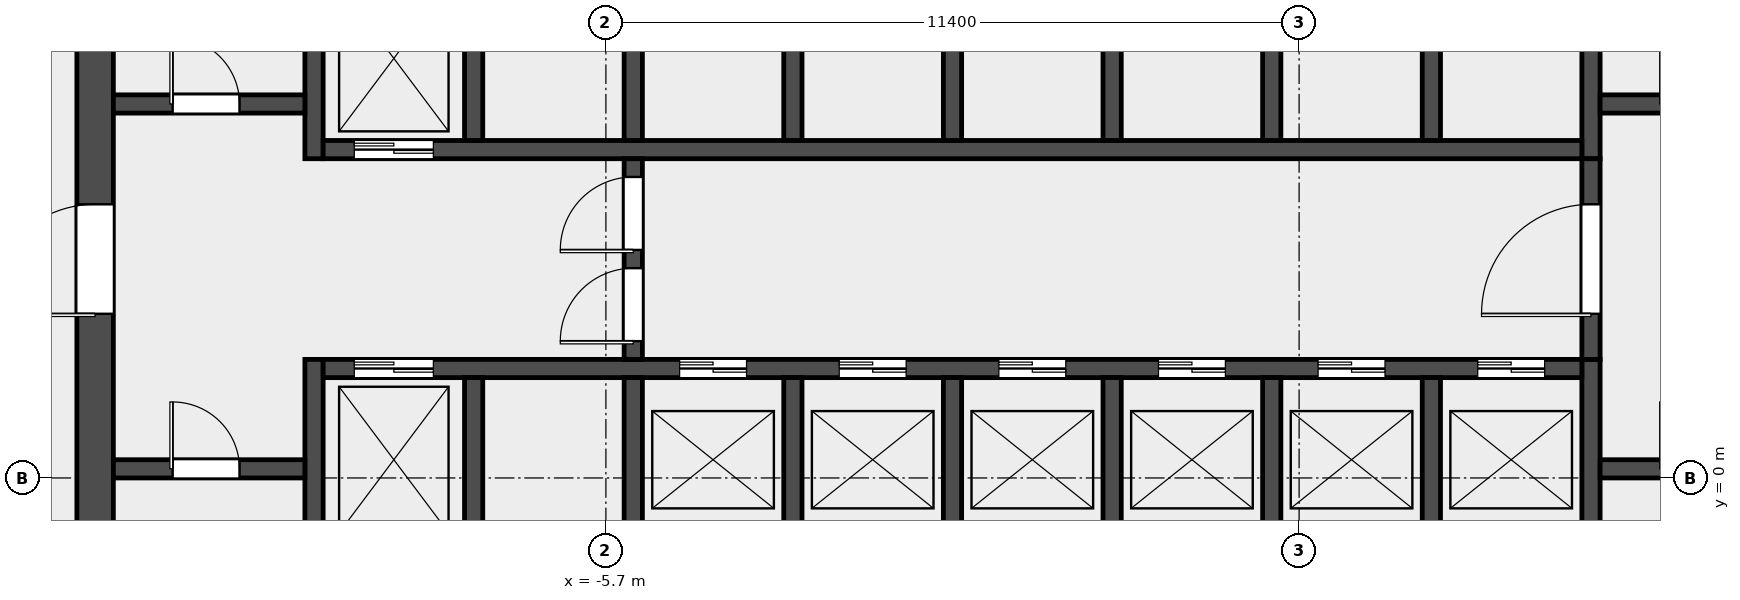
"""IFC4 building model, lengths in metres.
Left out: names, types, materials, properties, quantities, classifications, styles, units other than length and angle.
Written with IfcOpenShell. Run it as: python <this file> out.ifc"""

import sys

from ifc_helpers import new_model, si_unit, direction, frame, frame_2d, origin, place, context, subcontext, project, spatial, rectangle, extrude, element, fill, save


model = new_model("IFC4")
c1 = context("Model", 3, precision=1e-05, world=origin(), true_north=direction((0.0, 1.0)))
c2 = subcontext(c1, "Body", "Model", "MODEL_VIEW")
j1 = project(units=[si_unit("LENGTHUNIT", "METRE"), si_unit("PLANEANGLEUNIT", "RADIAN")], contexts=[c1])
p1 = place(None, origin())
s1 = spatial("IfcSite", under=j1, at=p1, CompositionType="ELEMENT")
p2 = place(p1, origin())
s2 = spatial("IfcBuilding", under=s1, at=p2, CompositionType="ELEMENT")
p3 = place(p2, frame((0.0, 0.0, 88.6)))
s3 = spatial("IfcBuildingStorey", under=s2, at=p3, CompositionType="ELEMENT", Elevation=88.6)
p4 = place(p3, frame((-14.1, -6.6, 0.0), z_axis=(0.0, 0.0, 1.0), x_axis=(0.0, 1.0, 0.0)))
e1 = element("IfcWall", 1, at=p4, inside=s3, PredefinedType="SHEAR", context=c2, shape_type="SweptSolid", body=[
    extrude(rectangle(XDim=19.5, YDim=0.6, at=frame_2d((9.75, 0.0))), origin(), (0.0, 0.0, 1.0), 5.7),
])
p5 = place(p4, frame((9.3, 0.0, 0.0)))
e2 = element("IfcOpeningElement", 2, at=p5, cuts=e1, PredefinedType="OPENING", context=c2, shape_type="SweptSolid", body=[
    extrude(rectangle(XDim=1.8, YDim=2.1, at=frame_2d((0.9, 1.05))), frame((0.0, 0.312, 0.0), z_axis=(0.0, -1.0, 0.0), x_axis=(1.0, 0.0, 0.0)), (0.0, 0.0, 1.0), 0.624),
])
p6 = place(p3, frame((-10.5, -6.6, 0.0), z_axis=(0.0, 0.0, 1.0), x_axis=(0.0, 1.0, 0.0)))
e3 = element("IfcWall", 3, at=p6, inside=s3, PredefinedType="SHEAR", context=c2, shape_type="SweptSolid", body=[
    extrude(rectangle(XDim=8.55, YDim=0.3, at=frame_2d((4.275, 0.0))), origin(), (0.0, 0.0, 1.0), 5.7),
])
p7 = place(p3, frame((-10.5, 5.25, 0.0), z_axis=(0.0, 0.0, 1.0), x_axis=(0.0, 1.0, 0.0)))
e4 = element("IfcWall", 4, at=p7, inside=s3, PredefinedType="SHEAR", context=c2, shape_type="SweptSolid", body=[
    extrude(rectangle(XDim=7.65, YDim=0.3, at=frame_2d((3.825, 0.0))), origin(), (0.0, 0.0, 1.0), 5.7),
])
p8 = place(p3, frame((10.5, -6.6, 0.0), z_axis=(0.0, 0.0, 1.0), x_axis=(0.0, 1.0, 0.0)))
e5 = element("IfcWall", 5, at=p8, inside=s3, PredefinedType="SHEAR", context=c2, shape_type="SweptSolid", body=[
    extrude(rectangle(XDim=8.55, YDim=0.3, at=frame_2d((4.275, 0.0))), origin(), (0.0, 0.0, 1.0), 5.7),
])
p9 = place(p3, frame((10.5, 5.25, 0.0), z_axis=(0.0, 0.0, 1.0), x_axis=(0.0, 1.0, 0.0)))
e6 = element("IfcWall", 6, at=p9, inside=s3, PredefinedType="SHEAR", context=c2, shape_type="SweptSolid", body=[
    extrude(rectangle(XDim=7.65, YDim=0.3, at=frame_2d((3.825, 0.0))), origin(), (0.0, 0.0, 1.0), 5.7),
])
p10 = place(p3, frame((-13.8, 0.15, 0.0), z_axis=(0.0, 0.0, 1.0), x_axis=(1.0, 0.0, 0.0)))
e7 = element("IfcWall", 7, at=p10, inside=s3, PredefinedType="SOLIDWALL", context=c2, shape_type="SweptSolid", body=[
    extrude(rectangle(XDim=3.15, YDim=0.3, at=frame_2d((1.575, 0.0))), origin(), (0.0, 0.0, 1.0), 5.7),
])
p11 = place(p10, frame((0.975, 0.0, 0.0)))
e8 = element("IfcOpeningElement", 8, at=p11, cuts=e7, PredefinedType="OPENING", context=c2, shape_type="SweptSolid", body=[
    extrude(rectangle(XDim=1.1, YDim=2.1, at=frame_2d((0.55, 1.05))), frame((0.0, 0.162, 0.0), z_axis=(0.0, -1.0, 0.0), x_axis=(1.0, 0.0, 0.0)), (0.0, 0.0, 1.0), 0.324),
])
p12 = place(p3, frame((-13.8, 6.15, 0.0), z_axis=(0.0, 0.0, 1.0), x_axis=(1.0, 0.0, 0.0)))
e9 = element("IfcWall", 9, at=p12, inside=s3, PredefinedType="SOLIDWALL", context=c2, shape_type="SweptSolid", body=[
    extrude(rectangle(XDim=3.15, YDim=0.3, at=frame_2d((1.575, 0.0))), origin(), (0.0, 0.0, 1.0), 5.7),
])
p13 = place(p12, frame((0.975, 0.0, 0.0)))
e10 = element("IfcOpeningElement", 10, at=p13, cuts=e9, PredefinedType="OPENING", context=c2, shape_type="SweptSolid", body=[
    extrude(rectangle(XDim=1.1, YDim=2.1, at=frame_2d((0.55, 1.05))), frame((0.0, 0.162, 0.0), z_axis=(0.0, -1.0, 0.0), x_axis=(1.0, 0.0, 0.0)), (0.0, 0.0, 1.0), 0.324),
])
p14 = place(p3, frame((10.65, 0.15, 0.0), z_axis=(0.0, 0.0, 1.0), x_axis=(1.0, 0.0, 0.0)))
e11 = element("IfcWall", 11, at=p14, inside=s3, PredefinedType="SOLIDWALL", context=c2, shape_type="SweptSolid", body=[
    extrude(rectangle(XDim=3.15, YDim=0.3, at=frame_2d((1.575, 0.0))), origin(), (0.0, 0.0, 1.0), 5.7),
])
p15 = place(p14, frame((1.025, 0.0, 0.0)))
e12 = element("IfcOpeningElement", 12, at=p15, cuts=e11, PredefinedType="OPENING", context=c2, shape_type="SweptSolid", body=[
    extrude(rectangle(XDim=1.1, YDim=2.1, at=frame_2d((0.55, 1.05))), frame((0.0, 0.162, 0.0), z_axis=(0.0, -1.0, 0.0), x_axis=(1.0, 0.0, 0.0)), (0.0, 0.0, 1.0), 0.324),
])
p16 = place(p3, frame((10.65, 6.15, 0.0), z_axis=(0.0, 0.0, 1.0), x_axis=(1.0, 0.0, 0.0)))
e13 = element("IfcWall", 13, at=p16, inside=s3, PredefinedType="SOLIDWALL", context=c2, shape_type="SweptSolid", body=[
    extrude(rectangle(XDim=3.15, YDim=0.3, at=frame_2d((1.575, 0.0))), origin(), (0.0, 0.0, 1.0), 5.7),
])
p17 = place(p16, frame((1.025, 0.0, 0.0)))
e14 = element("IfcOpeningElement", 14, at=p17, cuts=e13, PredefinedType="OPENING", context=c2, shape_type="SweptSolid", body=[
    extrude(rectangle(XDim=1.1, YDim=2.1, at=frame_2d((0.55, 1.05))), frame((0.0, 0.162, 0.0), z_axis=(0.0, -1.0, 0.0), x_axis=(1.0, 0.0, 0.0)), (0.0, 0.0, 1.0), 0.324),
])
p18 = place(p3, frame((-10.35, 1.8, 0.0), z_axis=(0.0, 0.0, 1.0), x_axis=(1.0, 0.0, 0.0)))
e15 = element("IfcWall", 15, at=p18, inside=s3, PredefinedType="SOLIDWALL", context=c2, shape_type="SweptSolid", body=[
    extrude(rectangle(XDim=20.7, YDim=0.3, at=frame_2d((10.35, 0.0))), origin(), (0.0, 0.0, 1.0), 5.7),
])
p19 = place(p18, frame((0.512, 0.0, 0.0)))
e16 = element("IfcOpeningElement", 16, at=p19, cuts=e15, PredefinedType="OPENING", context=c2, shape_type="SweptSolid", body=[
    extrude(rectangle(XDim=1.3, YDim=2.1, at=frame_2d((0.65, 1.05))), frame((0.0, 0.162, 0.0), z_axis=(0.0, -1.0, 0.0), x_axis=(1.0, 0.0, 0.0)), (0.0, 0.0, 1.0), 0.324),
])
p20 = place(p18, frame((5.863, 0.0, 0.0)))
e17 = element("IfcOpeningElement", 17, at=p20, cuts=e15, PredefinedType="OPENING", context=c2, shape_type="SweptSolid", body=[
    extrude(rectangle(XDim=1.1, YDim=2.1, at=frame_2d((0.55, 1.05))), frame((0.0, 0.162, 0.0), z_axis=(0.0, -1.0, 0.0), x_axis=(1.0, 0.0, 0.0)), (0.0, 0.0, 1.0), 0.324),
])
p21 = place(p18, frame((8.488, 0.0, 0.0)))
e18 = element("IfcOpeningElement", 18, at=p21, cuts=e15, PredefinedType="OPENING", context=c2, shape_type="SweptSolid", body=[
    extrude(rectangle(XDim=1.1, YDim=2.1, at=frame_2d((0.55, 1.05))), frame((0.0, 0.162, 0.0), z_axis=(0.0, -1.0, 0.0), x_axis=(1.0, 0.0, 0.0)), (0.0, 0.0, 1.0), 0.324),
])
p22 = place(p18, frame((11.113, 0.0, 0.0)))
e19 = element("IfcOpeningElement", 19, at=p22, cuts=e15, PredefinedType="OPENING", context=c2, shape_type="SweptSolid", body=[
    extrude(rectangle(XDim=1.1, YDim=2.1, at=frame_2d((0.55, 1.05))), frame((0.0, 0.162, 0.0), z_axis=(0.0, -1.0, 0.0), x_axis=(1.0, 0.0, 0.0)), (0.0, 0.0, 1.0), 0.324),
])
p23 = place(p18, frame((13.738, 0.0, 0.0)))
e20 = element("IfcOpeningElement", 20, at=p23, cuts=e15, PredefinedType="OPENING", context=c2, shape_type="SweptSolid", body=[
    extrude(rectangle(XDim=1.1, YDim=2.1, at=frame_2d((0.55, 1.05))), frame((0.0, 0.162, 0.0), z_axis=(0.0, -1.0, 0.0), x_axis=(1.0, 0.0, 0.0)), (0.0, 0.0, 1.0), 0.324),
])
p24 = place(p18, frame((16.363, 0.0, 0.0)))
e21 = element("IfcOpeningElement", 21, at=p24, cuts=e15, PredefinedType="OPENING", context=c2, shape_type="SweptSolid", body=[
    extrude(rectangle(XDim=1.1, YDim=2.1, at=frame_2d((0.55, 1.05))), frame((0.0, 0.162, 0.0), z_axis=(0.0, -1.0, 0.0), x_axis=(1.0, 0.0, 0.0)), (0.0, 0.0, 1.0), 0.324),
])
p25 = place(p18, frame((18.988, 0.0, 0.0)))
e22 = element("IfcOpeningElement", 22, at=p25, cuts=e15, PredefinedType="OPENING", context=c2, shape_type="SweptSolid", body=[
    extrude(rectangle(XDim=1.1, YDim=2.1, at=frame_2d((0.55, 1.05))), frame((0.0, 0.162, 0.0), z_axis=(0.0, -1.0, 0.0), x_axis=(1.0, 0.0, 0.0)), (0.0, 0.0, 1.0), 0.324),
])
p26 = place(p3, frame((-10.35, 5.4, 0.0), z_axis=(0.0, 0.0, 1.0), x_axis=(1.0, 0.0, 0.0)))
e23 = element("IfcWall", 23, at=p26, inside=s3, PredefinedType="SOLIDWALL", context=c2, shape_type="SweptSolid", body=[
    extrude(rectangle(XDim=20.7, YDim=0.3, at=frame_2d((10.35, 0.0))), origin(), (0.0, 0.0, 1.0), 5.7),
])
p27 = place(p26, frame((0.512, 0.0, 0.0)))
e24 = element("IfcOpeningElement", 24, at=p27, cuts=e23, PredefinedType="OPENING", context=c2, shape_type="SweptSolid", body=[
    extrude(rectangle(XDim=1.3, YDim=2.1, at=frame_2d((0.65, 1.05))), frame((0.0, 0.162, 0.0), z_axis=(0.0, -1.0, 0.0), x_axis=(1.0, 0.0, 0.0)), (0.0, 0.0, 1.0), 0.324),
])
for number, where, z_axis, x_axis in (
    (25, (-7.875, -1.05, 0.0), (0.0, 0.0, 1.0), (0.0, 1.0, 0.0)),
    (26, (-5.25, -1.05, 0.0), (0.0, 0.0, 1.0), (0.0, 1.0, 0.0)),
    (27, (-2.625, -1.05, 0.0), (0.0, 0.0, 1.0), (0.0, 1.0, 0.0)),
    (28, (0.0, -1.05, 0.0), (0.0, 0.0, 1.0), (0.0, 1.0, 0.0)),
    (29, (2.625, -1.05, 0.0), (0.0, 0.0, 1.0), (0.0, 1.0, 0.0)),
    (30, (5.25, -1.05, 0.0), (0.0, 0.0, 1.0), (0.0, 1.0, 0.0)),
    (31, (7.875, -1.05, 0.0), (0.0, 0.0, 1.0), (0.0, 1.0, 0.0)),
    (32, (-7.875, 5.55, 0.0), (0.0, 0.0, 1.0), (0.0, 1.0, 0.0)),
    (33, (-5.25, 5.55, 0.0), (0.0, 0.0, 1.0), (0.0, 1.0, 0.0)),
    (34, (-2.625, 5.55, 0.0), (0.0, 0.0, 1.0), (0.0, 1.0, 0.0)),
    (35, (0.0, 5.55, 0.0), (0.0, 0.0, 1.0), (0.0, 1.0, 0.0)),
    (36, (2.625, 5.55, 0.0), (0.0, 0.0, 1.0), (0.0, 1.0, 0.0)),
    (37, (5.25, 5.55, 0.0), (0.0, 0.0, 1.0), (0.0, 1.0, 0.0)),
    (38, (7.875, 5.55, 0.0), (0.0, 0.0, 1.0), (0.0, 1.0, 0.0)),
):
    element("IfcWall", number, at=place(p3, frame(where, z_axis=z_axis, x_axis=x_axis)), inside=s3, PredefinedType="SOLIDWALL", context=c2, shape_type="SweptSolid", body=[
        extrude(rectangle(XDim=2.7, YDim=0.3, at=frame_2d((1.35, 0.0))), origin(), (0.0, 0.0, 1.0), 5.7),
    ])
p28 = place(p3, frame((-5.25, 1.95, 0.0), z_axis=(0.0, 0.0, 1.0), x_axis=(0.0, 1.0, 0.0)))
e39 = element("IfcWall", 39, at=p28, inside=s3, PredefinedType="SOLIDWALL", context=c2, shape_type="SweptSolid", body=[
    extrude(rectangle(XDim=3.3, YDim=0.3, at=frame_2d((1.65, 0.0))), origin(), (0.0, 0.0, 1.0), 5.7),
])
p29 = place(p28, frame((0.3, 0.0, 0.0)))
e40 = element("IfcOpeningElement", 40, at=p29, cuts=e39, PredefinedType="OPENING", context=c2, shape_type="SweptSolid", body=[
    extrude(rectangle(XDim=1.2, YDim=2.1, at=frame_2d((0.6, 1.05))), frame((0.0, 0.162, 0.0), z_axis=(0.0, -1.0, 0.0), x_axis=(1.0, 0.0, 0.0)), (0.0, 0.0, 1.0), 0.324),
])
p30 = place(p28, frame((1.8, 0.0, 0.0)))
e41 = element("IfcOpeningElement", 41, at=p30, cuts=e39, PredefinedType="OPENING", context=c2, shape_type="SweptSolid", body=[
    extrude(rectangle(XDim=1.2, YDim=2.1, at=frame_2d((0.6, 1.05))), frame((0.0, 0.162, 0.0), z_axis=(0.0, -1.0, 0.0), x_axis=(1.0, 0.0, 0.0)), (0.0, 0.0, 1.0), 0.324),
])
p31 = place(p3, frame((10.5, 1.95, 0.0), z_axis=(0.0, 0.0, 1.0), x_axis=(0.0, 1.0, 0.0)))
e42 = element("IfcWall", 42, at=p31, inside=s3, PredefinedType="SOLIDWALL", context=c2, shape_type="SweptSolid", body=[
    extrude(rectangle(XDim=3.3, YDim=0.3, at=frame_2d((1.65, 0.0))), origin(), (0.0, 0.0, 1.0), 5.7),
])
p32 = place(p31, frame((0.75, 0.0, 0.0)))
e43 = element("IfcOpeningElement", 43, at=p32, cuts=e42, PredefinedType="OPENING", context=c2, shape_type="SweptSolid", body=[
    extrude(rectangle(XDim=1.8, YDim=2.1, at=frame_2d((0.9, 1.05))), frame((0.0, 0.162, 0.0), z_axis=(0.0, -1.0, 0.0), x_axis=(1.0, 0.0, 0.0)), (0.0, 0.0, 1.0), 0.324),
])
p33 = place(p11, origin())
e44 = element("IfcDoor", 44, at=p33, inside=s3, OperationType="SINGLE_SWING_LEFT", PredefinedType="DOOR", context=c2, shape_type="SweptSolid", body=[
    extrude(rectangle(XDim=1.1, YDim=2.1, at=frame_2d((0.55, 1.05))), frame((0.0, 0.025, 0.0), z_axis=(0.0, -1.0, 0.0), x_axis=(1.0, 0.0, 0.0)), (0.0, 0.0, 1.0), 0.05),
])
fill(e8, e44)
p34 = place(p13, origin())
e45 = element("IfcDoor", 45, at=p34, inside=s3, OperationType="SINGLE_SWING_LEFT", PredefinedType="DOOR", context=c2, shape_type="SweptSolid", body=[
    extrude(rectangle(XDim=1.1, YDim=2.1, at=frame_2d((0.55, 1.05))), frame((0.0, 0.025, 0.0), z_axis=(0.0, -1.0, 0.0), x_axis=(1.0, 0.0, 0.0)), (0.0, 0.0, 1.0), 0.05),
])
fill(e10, e45)
p35 = place(p5, origin())
e46 = element("IfcDoor", 46, at=p35, inside=s3, OperationType="DOUBLE_DOOR_SINGLE_SWING", PredefinedType="DOOR", context=c2, shape_type="SweptSolid", body=[
    extrude(rectangle(XDim=1.8, YDim=2.1, at=frame_2d((0.9, 1.05))), frame((0.0, 0.025, 0.0), z_axis=(0.0, -1.0, 0.0), x_axis=(1.0, 0.0, 0.0)), (0.0, 0.0, 1.0), 0.05),
])
fill(e2, e46)
p36 = place(p29, origin())
e47 = element("IfcDoor", 47, at=p36, inside=s3, OperationType="SINGLE_SWING_LEFT", PredefinedType="DOOR", context=c2, shape_type="SweptSolid", body=[
    extrude(rectangle(XDim=1.2, YDim=2.1, at=frame_2d((0.6, 1.05))), frame((0.0, 0.025, 0.0), z_axis=(0.0, -1.0, 0.0), x_axis=(1.0, 0.0, 0.0)), (0.0, 0.0, 1.0), 0.05),
])
fill(e40, e47)
p37 = place(p30, origin())
e48 = element("IfcDoor", 48, at=p37, inside=s3, OperationType="SINGLE_SWING_RIGHT", PredefinedType="DOOR", context=c2, shape_type="SweptSolid", body=[
    extrude(rectangle(XDim=1.2, YDim=2.1, at=frame_2d((0.6, 1.05))), frame((0.0, 0.025, 0.0), z_axis=(0.0, -1.0, 0.0), x_axis=(1.0, 0.0, 0.0)), (0.0, 0.0, 1.0), 0.05),
])
fill(e41, e48)
p38 = place(p32, origin())
e49 = element("IfcDoor", 49, at=p38, inside=s3, OperationType="DOUBLE_DOOR_SINGLE_SWING", PredefinedType="DOOR", context=c2, shape_type="SweptSolid", body=[
    extrude(rectangle(XDim=1.8, YDim=2.1, at=frame_2d((0.9, 1.05))), frame((0.0, 0.025, 0.0), z_axis=(0.0, -1.0, 0.0), x_axis=(1.0, 0.0, 0.0)), (0.0, 0.0, 1.0), 0.05),
])
fill(e43, e49)
p39 = place(p19, origin())
e50 = element("IfcDoor", 50, at=p39, inside=s3, OperationType="DOUBLE_DOOR_SLIDING", PredefinedType="DOOR", context=c2, shape_type="SweptSolid", body=[
    extrude(rectangle(XDim=1.3, YDim=2.1, at=frame_2d((0.65, 1.05))), frame((0.0, 0.025, 0.0), z_axis=(0.0, -1.0, 0.0), x_axis=(1.0, 0.0, 0.0)), (0.0, 0.0, 1.0), 0.05),
])
fill(e16, e50)
p40 = place(p20, origin())
e51 = element("IfcDoor", 51, at=p40, inside=s3, OperationType="DOUBLE_DOOR_SLIDING", PredefinedType="DOOR", context=c2, shape_type="SweptSolid", body=[
    extrude(rectangle(XDim=1.1, YDim=2.1, at=frame_2d((0.55, 1.05))), frame((0.0, 0.025, 0.0), z_axis=(0.0, -1.0, 0.0), x_axis=(1.0, 0.0, 0.0)), (0.0, 0.0, 1.0), 0.05),
])
fill(e17, e51)
p41 = place(p21, origin())
e52 = element("IfcDoor", 52, at=p41, inside=s3, OperationType="DOUBLE_DOOR_SLIDING", PredefinedType="DOOR", context=c2, shape_type="SweptSolid", body=[
    extrude(rectangle(XDim=1.1, YDim=2.1, at=frame_2d((0.55, 1.05))), frame((0.0, 0.025, 0.0), z_axis=(0.0, -1.0, 0.0), x_axis=(1.0, 0.0, 0.0)), (0.0, 0.0, 1.0), 0.05),
])
fill(e18, e52)
p42 = place(p22, origin())
e53 = element("IfcDoor", 53, at=p42, inside=s3, OperationType="DOUBLE_DOOR_SLIDING", PredefinedType="DOOR", context=c2, shape_type="SweptSolid", body=[
    extrude(rectangle(XDim=1.1, YDim=2.1, at=frame_2d((0.55, 1.05))), frame((0.0, 0.025, 0.0), z_axis=(0.0, -1.0, 0.0), x_axis=(1.0, 0.0, 0.0)), (0.0, 0.0, 1.0), 0.05),
])
fill(e19, e53)
p43 = place(p23, origin())
e54 = element("IfcDoor", 54, at=p43, inside=s3, OperationType="DOUBLE_DOOR_SLIDING", PredefinedType="DOOR", context=c2, shape_type="SweptSolid", body=[
    extrude(rectangle(XDim=1.1, YDim=2.1, at=frame_2d((0.55, 1.05))), frame((0.0, 0.025, 0.0), z_axis=(0.0, -1.0, 0.0), x_axis=(1.0, 0.0, 0.0)), (0.0, 0.0, 1.0), 0.05),
])
fill(e20, e54)
p44 = place(p24, origin())
e55 = element("IfcDoor", 55, at=p44, inside=s3, OperationType="DOUBLE_DOOR_SLIDING", PredefinedType="DOOR", context=c2, shape_type="SweptSolid", body=[
    extrude(rectangle(XDim=1.1, YDim=2.1, at=frame_2d((0.55, 1.05))), frame((0.0, 0.025, 0.0), z_axis=(0.0, -1.0, 0.0), x_axis=(1.0, 0.0, 0.0)), (0.0, 0.0, 1.0), 0.05),
])
fill(e21, e55)
p45 = place(p25, origin())
e56 = element("IfcDoor", 56, at=p45, inside=s3, OperationType="DOUBLE_DOOR_SLIDING", PredefinedType="DOOR", context=c2, shape_type="SweptSolid", body=[
    extrude(rectangle(XDim=1.1, YDim=2.1, at=frame_2d((0.55, 1.05))), frame((0.0, 0.025, 0.0), z_axis=(0.0, -1.0, 0.0), x_axis=(1.0, 0.0, 0.0)), (0.0, 0.0, 1.0), 0.05),
])
fill(e22, e56)
p46 = place(p27, origin())
e57 = element("IfcDoor", 57, at=p46, inside=s3, OperationType="DOUBLE_DOOR_SLIDING", PredefinedType="DOOR", context=c2, shape_type="SweptSolid", body=[
    extrude(rectangle(XDim=1.3, YDim=2.1, at=frame_2d((0.65, 1.05))), frame((0.0, 0.025, 0.0), z_axis=(0.0, -1.0, 0.0), x_axis=(1.0, 0.0, 0.0)), (0.0, 0.0, 1.0), 0.05),
])
fill(e24, e57)
save(model, sys.argv[1])
